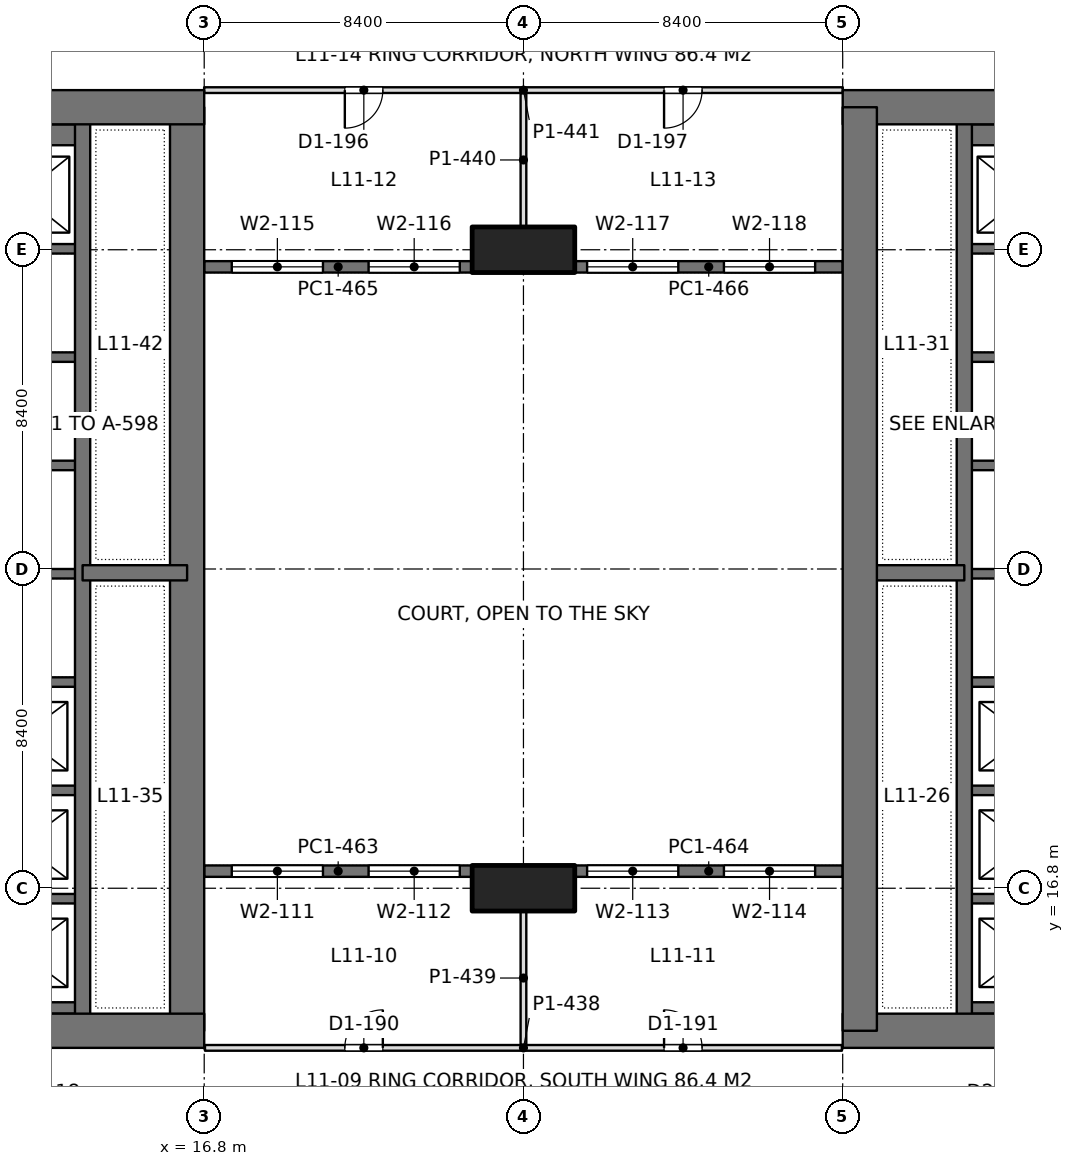
"""IFC4 building model, lengths in metres.
Left out: names, types, materials, properties, quantities, classifications, styles, units other than length and angle.
Written with IfcOpenShell. Run it as: python <this file> out.ifc"""

import sys

from ifc_helpers import new_model, si_unit, direction, frame, frame_2d, origin, origin_2d, place, context, subcontext, project, spatial, rectangle, extrude, element, fill, save


model = new_model("IFC4")
c1 = context("Model", 3, precision=1e-05, world=origin(), true_north=direction((0.0, 1.0)))
c2 = subcontext(c1, "Body", "Model", "MODEL_VIEW")
j1 = project(units=[si_unit("LENGTHUNIT", "METRE"), si_unit("PLANEANGLEUNIT", "RADIAN")], contexts=[c1])
p1 = place(None, origin())
s1 = spatial("IfcSite", under=j1, at=p1, CompositionType="ELEMENT")
p2 = place(p1, origin())
s2 = spatial("IfcBuilding", under=s1, at=p2, CompositionType="ELEMENT")
p3 = place(p2, frame((0.0, 0.0, 50.4)))
s3 = spatial("IfcBuildingStorey", under=s2, at=p3, CompositionType="ELEMENT", Elevation=50.4)
for number, where, z_axis, x_axis in (
    (1, (25.2, 16.8, 0.0), (0.0, 0.0, 1.0), (1.0, 0.0, 0.0)),
    (2, (25.2, 33.6, 0.0), (0.0, 0.0, 1.0), (1.0, 0.0, 0.0)),
):
    element("IfcColumn", number, at=place(p3, frame(where, z_axis=z_axis, x_axis=x_axis)), inside=s3, PredefinedType="COLUMN", context=c2, shape_type="SweptSolid", body=[
        extrude(rectangle(XDim=2.7, YDim=1.2, at=origin_2d()), origin(), (0.0, 0.0, 1.0), 4.5),
    ])
p4 = place(p3, frame((-1.2, 13.05, 0.0), z_axis=(0.0, 0.0, 1.0), x_axis=(1.0, 0.0, 0.0)))
e3 = element("IfcWall", 3, at=p4, inside=s3, PredefinedType="SHEAR", context=c2, shape_type="SweptSolid", body=[
    extrude(rectangle(XDim=18.0, YDim=0.9, at=frame_2d((9.0, 0.0))), origin(), (0.0, 0.0, 1.0), 4.5),
])
p5 = place(p4, frame((8.95, 0.0, 0.0)))
e4 = element("IfcOpeningElement", 4, at=p5, cuts=e3, PredefinedType="OPENING", context=c2, shape_type="SweptSolid", body=[
    extrude(rectangle(XDim=1.8, YDim=2.4, at=frame_2d((0.9, 1.2))), frame((0.0, 0.46, 0.0), z_axis=(0.0, -1.0, 0.0), x_axis=(1.0, 0.0, 0.0)), (0.0, 0.0, 1.0), 0.92),
])
p6 = place(p3, frame((-1.2, 37.35, 0.0), z_axis=(0.0, 0.0, 1.0), x_axis=(1.0, 0.0, 0.0)))
e5 = element("IfcWall", 5, at=p6, inside=s3, PredefinedType="SHEAR", context=c2, shape_type="SweptSolid", body=[
    extrude(rectangle(XDim=18.0, YDim=0.9, at=frame_2d((9.0, 0.0))), origin(), (0.0, 0.0, 1.0), 4.5),
])
p7 = place(p6, frame((8.95, 0.0, 0.0)))
e6 = element("IfcOpeningElement", 6, at=p7, cuts=e5, PredefinedType="OPENING", context=c2, shape_type="SweptSolid", body=[
    extrude(rectangle(XDim=1.8, YDim=2.4, at=frame_2d((0.9, 1.2))), frame((0.0, 0.46, 0.0), z_axis=(0.0, -1.0, 0.0), x_axis=(1.0, 0.0, 0.0)), (0.0, 0.0, 1.0), 0.92),
])
p8 = place(p3, frame((16.35, 13.05, 0.0), z_axis=(0.0, 0.0, 1.0), x_axis=(0.0, 1.0, 0.0)))
e7 = element("IfcWall", 7, at=p8, inside=s3, PredefinedType="SHEAR", context=c2, shape_type="SweptSolid", body=[
    extrude(rectangle(XDim=24.3, YDim=0.9, at=frame_2d((12.15, 0.0))), origin(), (0.0, 0.0, 1.0), 4.5),
])
p9 = place(p3, frame((13.6, 13.05, 0.0), z_axis=(0.0, 0.0, 1.0), x_axis=(0.0, 1.0, 0.0)))
e8 = element("IfcWall", 8, at=p9, inside=s3, PredefinedType="SHEAR", context=c2, shape_type="SweptSolid", body=[
    extrude(rectangle(XDim=24.3, YDim=0.4, at=frame_2d((12.15, 0.0))), origin(), (0.0, 0.0, 1.0), 4.5),
])
p10 = place(p3, frame((13.6, 25.1, 0.0), z_axis=(0.0, 0.0, 1.0), x_axis=(1.0, 0.0, 0.0)))
e9 = element("IfcWall", 9, at=p10, inside=s3, PredefinedType="SHEAR", context=c2, shape_type="SweptSolid", body=[
    extrude(rectangle(XDim=2.75, YDim=0.4, at=frame_2d((1.375, 0.0))), origin(), (0.0, 0.0, 1.0), 4.5),
])
p11 = place(p3, frame((10.4, 13.65, 0.0), z_axis=(0.0, 0.0, 1.0), x_axis=(1.0, 0.0, 0.0)))
e10 = element("IfcWall", 10, at=p11, inside=s3, PredefinedType="SHEAR", context=c2, shape_type="SweptSolid", body=[
    extrude(rectangle(XDim=3.2, YDim=0.3, at=frame_2d((1.6, 0.0))), origin(), (0.0, 0.0, 1.0), 4.5),
])
for number, where, z_axis, x_axis in (
    (11, (10.4, 16.525, 0.0), (0.0, 0.0, 1.0), (1.0, 0.0, 0.0)),
    (12, (10.4, 19.375, 0.0), (0.0, 0.0, 1.0), (1.0, 0.0, 0.0)),
    (13, (10.4, 22.225, 0.0), (0.0, 0.0, 1.0), (1.0, 0.0, 0.0)),
    (14, (10.4, 25.075, 0.0), (0.0, 0.0, 1.0), (1.0, 0.0, 0.0)),
    (15, (10.4, 27.925, 0.0), (0.0, 0.0, 1.0), (1.0, 0.0, 0.0)),
    (16, (10.4, 30.775, 0.0), (0.0, 0.0, 1.0), (1.0, 0.0, 0.0)),
    (17, (10.4, 33.625, 0.0), (0.0, 0.0, 1.0), (1.0, 0.0, 0.0)),
):
    element("IfcWall", number, at=place(p3, frame(where, z_axis=z_axis, x_axis=x_axis)), inside=s3, PredefinedType="SHEAR", context=c2, shape_type="SweptSolid", body=[
        extrude(rectangle(XDim=3.2, YDim=0.25, at=frame_2d((1.6, 0.0))), origin(), (0.0, 0.0, 1.0), 4.5),
    ])
p12 = place(p3, frame((10.4, 36.625, 0.0), z_axis=(0.0, 0.0, 1.0), x_axis=(1.0, 0.0, 0.0)))
e18 = element("IfcWall", 18, at=p12, inside=s3, PredefinedType="SHEAR", context=c2, shape_type="SweptSolid", body=[
    extrude(rectangle(XDim=3.2, YDim=0.55, at=frame_2d((1.6, 0.0))), origin(), (0.0, 0.0, 1.0), 4.5),
])
p13 = place(p3, frame((33.6, 13.05, 0.0), z_axis=(0.0, 0.0, 1.0), x_axis=(1.0, 0.0, 0.0)))
e19 = element("IfcWall", 19, at=p13, inside=s3, PredefinedType="SHEAR", context=c2, shape_type="SweptSolid", body=[
    extrude(rectangle(XDim=18.0, YDim=0.9, at=frame_2d((9.0, 0.0))), origin(), (0.0, 0.0, 1.0), 4.5),
])
p14 = place(p13, frame((7.25, 0.0, 0.0)))
e20 = element("IfcOpeningElement", 20, at=p14, cuts=e19, PredefinedType="OPENING", context=c2, shape_type="SweptSolid", body=[
    extrude(rectangle(XDim=1.8, YDim=2.4, at=frame_2d((0.9, 1.2))), frame((0.0, 0.46, 0.0), z_axis=(0.0, -1.0, 0.0), x_axis=(1.0, 0.0, 0.0)), (0.0, 0.0, 1.0), 0.92),
])
p15 = place(p3, frame((33.6, 37.35, 0.0), z_axis=(0.0, 0.0, 1.0), x_axis=(1.0, 0.0, 0.0)))
e21 = element("IfcWall", 21, at=p15, inside=s3, PredefinedType="SHEAR", context=c2, shape_type="SweptSolid", body=[
    extrude(rectangle(XDim=18.0, YDim=0.9, at=frame_2d((9.0, 0.0))), origin(), (0.0, 0.0, 1.0), 4.5),
])
p16 = place(p15, frame((7.25, 0.0, 0.0)))
e22 = element("IfcOpeningElement", 22, at=p16, cuts=e21, PredefinedType="OPENING", context=c2, shape_type="SweptSolid", body=[
    extrude(rectangle(XDim=1.8, YDim=2.4, at=frame_2d((0.9, 1.2))), frame((0.0, 0.46, 0.0), z_axis=(0.0, -1.0, 0.0), x_axis=(1.0, 0.0, 0.0)), (0.0, 0.0, 1.0), 0.92),
])
p17 = place(p3, frame((34.05, 13.05, 0.0), z_axis=(0.0, 0.0, 1.0), x_axis=(0.0, 1.0, 0.0)))
e23 = element("IfcWall", 23, at=p17, inside=s3, PredefinedType="SHEAR", context=c2, shape_type="SweptSolid", body=[
    extrude(rectangle(XDim=24.3, YDim=0.9, at=frame_2d((12.15, 0.0))), origin(), (0.0, 0.0, 1.0), 4.5),
])
p18 = place(p3, frame((36.8, 13.05, 0.0), z_axis=(0.0, 0.0, 1.0), x_axis=(0.0, 1.0, 0.0)))
e24 = element("IfcWall", 24, at=p18, inside=s3, PredefinedType="SHEAR", context=c2, shape_type="SweptSolid", body=[
    extrude(rectangle(XDim=24.3, YDim=0.4, at=frame_2d((12.15, 0.0))), origin(), (0.0, 0.0, 1.0), 4.5),
])
p19 = place(p3, frame((36.8, 25.1, 0.0), z_axis=(0.0, 0.0, 1.0), x_axis=(-1.0, 0.0, 0.0)))
e25 = element("IfcWall", 25, at=p19, inside=s3, PredefinedType="SHEAR", context=c2, shape_type="SweptSolid", body=[
    extrude(rectangle(XDim=2.75, YDim=0.4, at=frame_2d((1.375, 0.0))), origin(), (0.0, 0.0, 1.0), 4.5),
])
p20 = place(p3, frame((40.0, 13.65, 0.0), z_axis=(0.0, 0.0, 1.0), x_axis=(-1.0, 0.0, 0.0)))
e26 = element("IfcWall", 26, at=p20, inside=s3, PredefinedType="SHEAR", context=c2, shape_type="SweptSolid", body=[
    extrude(rectangle(XDim=3.2, YDim=0.3, at=frame_2d((1.6, 0.0))), origin(), (0.0, 0.0, 1.0), 4.5),
])
for number, where, z_axis, x_axis in (
    (27, (40.0, 16.525, 0.0), (0.0, 0.0, 1.0), (-1.0, 0.0, 0.0)),
    (28, (40.0, 19.375, 0.0), (0.0, 0.0, 1.0), (-1.0, 0.0, 0.0)),
    (29, (40.0, 22.225, 0.0), (0.0, 0.0, 1.0), (-1.0, 0.0, 0.0)),
    (30, (40.0, 25.075, 0.0), (0.0, 0.0, 1.0), (-1.0, 0.0, 0.0)),
    (31, (40.0, 27.925, 0.0), (0.0, 0.0, 1.0), (-1.0, 0.0, 0.0)),
    (32, (40.0, 30.775, 0.0), (0.0, 0.0, 1.0), (-1.0, 0.0, 0.0)),
    (33, (40.0, 33.625, 0.0), (0.0, 0.0, 1.0), (-1.0, 0.0, 0.0)),
):
    element("IfcWall", number, at=place(p3, frame(where, z_axis=z_axis, x_axis=x_axis)), inside=s3, PredefinedType="SHEAR", context=c2, shape_type="SweptSolid", body=[
        extrude(rectangle(XDim=3.2, YDim=0.25, at=frame_2d((1.6, 0.0))), origin(), (0.0, 0.0, 1.0), 4.5),
    ])
p21 = place(p3, frame((40.0, 36.625, 0.0), z_axis=(0.0, 0.0, 1.0), x_axis=(-1.0, 0.0, 0.0)))
e34 = element("IfcWall", 34, at=p21, inside=s3, PredefinedType="SHEAR", context=c2, shape_type="SweptSolid", body=[
    extrude(rectangle(XDim=3.2, YDim=0.55, at=frame_2d((1.6, 0.0))), origin(), (0.0, 0.0, 1.0), 4.5),
])
p22 = place(p3, frame((16.8, 17.25, 0.0), z_axis=(0.0, 0.0, 1.0), x_axis=(1.0, 0.0, 0.0)))
e35 = element("IfcWall", 35, at=p22, inside=s3, PredefinedType="SOLIDWALL", context=c2, shape_type="SweptSolid", body=[
    extrude(rectangle(XDim=7.05, YDim=0.3, at=frame_2d((3.525, 0.0))), origin(), (0.0, 0.0, 1.0), 4.34),
])
p23 = place(p22, frame((0.725, 0.0, 0.9)))
e36 = element("IfcOpeningElement", 36, at=p23, cuts=e35, PredefinedType="OPENING", context=c2, shape_type="SweptSolid", body=[
    extrude(rectangle(XDim=2.4, YDim=1.9, at=frame_2d((1.2, 0.95))), frame((0.0, 0.16, 0.0), z_axis=(0.0, -1.0, 0.0), x_axis=(1.0, 0.0, 0.0)), (0.0, 0.0, 1.0), 0.32),
])
p24 = place(p22, frame((4.325, 0.0, 0.9)))
e37 = element("IfcOpeningElement", 37, at=p24, cuts=e35, PredefinedType="OPENING", context=c2, shape_type="SweptSolid", body=[
    extrude(rectangle(XDim=2.4, YDim=1.9, at=frame_2d((1.2, 0.95))), frame((0.0, 0.16, 0.0), z_axis=(0.0, -1.0, 0.0), x_axis=(1.0, 0.0, 0.0)), (0.0, 0.0, 1.0), 0.32),
])
p25 = place(p3, frame((26.55, 17.25, 0.0), z_axis=(0.0, 0.0, 1.0), x_axis=(1.0, 0.0, 0.0)))
e38 = element("IfcWall", 38, at=p25, inside=s3, PredefinedType="SOLIDWALL", context=c2, shape_type="SweptSolid", body=[
    extrude(rectangle(XDim=7.05, YDim=0.3, at=frame_2d((3.525, 0.0))), origin(), (0.0, 0.0, 1.0), 4.34),
])
p26 = place(p25, frame((0.325, 0.0, 0.9)))
e39 = element("IfcOpeningElement", 39, at=p26, cuts=e38, PredefinedType="OPENING", context=c2, shape_type="SweptSolid", body=[
    extrude(rectangle(XDim=2.4, YDim=1.9, at=frame_2d((1.2, 0.95))), frame((0.0, 0.16, 0.0), z_axis=(0.0, -1.0, 0.0), x_axis=(1.0, 0.0, 0.0)), (0.0, 0.0, 1.0), 0.32),
])
p27 = place(p25, frame((3.925, 0.0, 0.9)))
e40 = element("IfcOpeningElement", 40, at=p27, cuts=e38, PredefinedType="OPENING", context=c2, shape_type="SweptSolid", body=[
    extrude(rectangle(XDim=2.4, YDim=1.9, at=frame_2d((1.2, 0.95))), frame((0.0, 0.16, 0.0), z_axis=(0.0, -1.0, 0.0), x_axis=(1.0, 0.0, 0.0)), (0.0, 0.0, 1.0), 0.32),
])
p28 = place(p3, frame((16.8, 33.15, 0.0), z_axis=(0.0, 0.0, 1.0), x_axis=(1.0, 0.0, 0.0)))
e41 = element("IfcWall", 41, at=p28, inside=s3, PredefinedType="SOLIDWALL", context=c2, shape_type="SweptSolid", body=[
    extrude(rectangle(XDim=7.05, YDim=0.3, at=frame_2d((3.525, 0.0))), origin(), (0.0, 0.0, 1.0), 4.34),
])
p29 = place(p28, frame((0.725, 0.0, 0.9)))
e42 = element("IfcOpeningElement", 42, at=p29, cuts=e41, PredefinedType="OPENING", context=c2, shape_type="SweptSolid", body=[
    extrude(rectangle(XDim=2.4, YDim=1.9, at=frame_2d((1.2, 0.95))), frame((0.0, 0.16, 0.0), z_axis=(0.0, -1.0, 0.0), x_axis=(1.0, 0.0, 0.0)), (0.0, 0.0, 1.0), 0.32),
])
p30 = place(p28, frame((4.325, 0.0, 0.9)))
e43 = element("IfcOpeningElement", 43, at=p30, cuts=e41, PredefinedType="OPENING", context=c2, shape_type="SweptSolid", body=[
    extrude(rectangle(XDim=2.4, YDim=1.9, at=frame_2d((1.2, 0.95))), frame((0.0, 0.16, 0.0), z_axis=(0.0, -1.0, 0.0), x_axis=(1.0, 0.0, 0.0)), (0.0, 0.0, 1.0), 0.32),
])
p31 = place(p3, frame((26.55, 33.15, 0.0), z_axis=(0.0, 0.0, 1.0), x_axis=(1.0, 0.0, 0.0)))
e44 = element("IfcWall", 44, at=p31, inside=s3, PredefinedType="SOLIDWALL", context=c2, shape_type="SweptSolid", body=[
    extrude(rectangle(XDim=7.05, YDim=0.3, at=frame_2d((3.525, 0.0))), origin(), (0.0, 0.0, 1.0), 4.34),
])
p32 = place(p31, frame((0.325, 0.0, 0.9)))
e45 = element("IfcOpeningElement", 45, at=p32, cuts=e44, PredefinedType="OPENING", context=c2, shape_type="SweptSolid", body=[
    extrude(rectangle(XDim=2.4, YDim=1.9, at=frame_2d((1.2, 0.95))), frame((0.0, 0.16, 0.0), z_axis=(0.0, -1.0, 0.0), x_axis=(1.0, 0.0, 0.0)), (0.0, 0.0, 1.0), 0.32),
])
p33 = place(p31, frame((3.925, 0.0, 0.9)))
e46 = element("IfcOpeningElement", 46, at=p33, cuts=e44, PredefinedType="OPENING", context=c2, shape_type="SweptSolid", body=[
    extrude(rectangle(XDim=2.4, YDim=1.9, at=frame_2d((1.2, 0.95))), frame((0.0, 0.16, 0.0), z_axis=(0.0, -1.0, 0.0), x_axis=(1.0, 0.0, 0.0)), (0.0, 0.0, 1.0), 0.32),
])
p34 = place(p3, frame((16.82, 12.6, 0.0), z_axis=(0.0, 0.0, 1.0), x_axis=(1.0, 0.0, 0.0)))
e47 = element("IfcWall", 47, at=p34, inside=s3, PredefinedType="PARTITIONING", context=c2, shape_type="SweptSolid", body=[
    extrude(rectangle(XDim=16.76, YDim=0.15, at=frame_2d((8.38, 0.0))), origin(), (0.0, 0.0, 1.0), 3.74),
])
p35 = place(p34, frame((3.68, 0.0, 0.0)))
e48 = element("IfcOpeningElement", 48, at=p35, cuts=e47, PredefinedType="OPENING", context=c2, shape_type="SweptSolid", body=[
    extrude(rectangle(XDim=1.0, YDim=2.2, at=frame_2d((0.5, 1.1))), frame((0.0, 0.085, 0.0), z_axis=(0.0, -1.0, 0.0), x_axis=(1.0, 0.0, 0.0)), (0.0, 0.0, 1.0), 0.17),
])
p36 = place(p34, frame((12.08, 0.0, 0.0)))
e49 = element("IfcOpeningElement", 49, at=p36, cuts=e47, PredefinedType="OPENING", context=c2, shape_type="SweptSolid", body=[
    extrude(rectangle(XDim=1.0, YDim=2.2, at=frame_2d((0.5, 1.1))), frame((0.0, 0.085, 0.0), z_axis=(0.0, -1.0, 0.0), x_axis=(1.0, 0.0, 0.0)), (0.0, 0.0, 1.0), 0.17),
])
p37 = place(p3, frame((25.2, 12.674, 0.0), z_axis=(0.0, 0.0, 1.0), x_axis=(0.0, 1.0, 0.0)))
e50 = element("IfcWall", 50, at=p37, inside=s3, PredefinedType="PARTITIONING", context=c2, shape_type="SweptSolid", body=[
    extrude(rectangle(XDim=3.527, YDim=0.15, at=frame_2d((1.763, 0.0))), origin(), (0.0, 0.0, 1.0), 3.74),
])
p38 = place(p3, frame((16.798, 37.8, 0.0), z_axis=(0.0, 0.0, 1.0), x_axis=(1.0, 0.0, 0.0)))
e51 = element("IfcWall", 51, at=p38, inside=s3, PredefinedType="PARTITIONING", context=c2, shape_type="SweptSolid", body=[
    extrude(rectangle(XDim=16.804, YDim=0.15, at=frame_2d((8.402, 0.0))), origin(), (0.0, 0.0, 1.0), 3.74),
])
p39 = place(p38, frame((3.702, 0.0, 0.0)))
e52 = element("IfcOpeningElement", 52, at=p39, cuts=e51, PredefinedType="OPENING", context=c2, shape_type="SweptSolid", body=[
    extrude(rectangle(XDim=1.0, YDim=2.2, at=frame_2d((0.5, 1.1))), frame((0.0, 0.085, 0.0), z_axis=(0.0, -1.0, 0.0), x_axis=(1.0, 0.0, 0.0)), (0.0, 0.0, 1.0), 0.17),
])
p40 = place(p38, frame((12.102, 0.0, 0.0)))
e53 = element("IfcOpeningElement", 53, at=p40, cuts=e51, PredefinedType="OPENING", context=c2, shape_type="SweptSolid", body=[
    extrude(rectangle(XDim=1.0, YDim=2.2, at=frame_2d((0.5, 1.1))), frame((0.0, 0.085, 0.0), z_axis=(0.0, -1.0, 0.0), x_axis=(1.0, 0.0, 0.0)), (0.0, 0.0, 1.0), 0.17),
])
p41 = place(p3, frame((25.2, 34.199, 0.0), z_axis=(0.0, 0.0, 1.0), x_axis=(0.0, 1.0, 0.0)))
e54 = element("IfcWall", 54, at=p41, inside=s3, PredefinedType="PARTITIONING", context=c2, shape_type="SweptSolid", body=[
    extrude(rectangle(XDim=3.527, YDim=0.15, at=frame_2d((1.764, 0.0))), origin(), (0.0, 0.0, 1.0), 3.74),
])
p42 = place(p23, origin())
e55 = element("IfcWindow", 55, at=p42, inside=s3, PartitioningType="SINGLE_PANEL", PredefinedType="WINDOW", context=c2, shape_type="SweptSolid", body=[
    extrude(rectangle(XDim=2.4, YDim=1.9, at=frame_2d((1.2, 0.95))), frame((0.0, 0.03, 0.0), z_axis=(0.0, -1.0, 0.0), x_axis=(1.0, 0.0, 0.0)), (0.0, 0.0, 1.0), 0.06),
])
fill(e36, e55)
p43 = place(p24, origin())
e56 = element("IfcWindow", 56, at=p43, inside=s3, PartitioningType="SINGLE_PANEL", PredefinedType="WINDOW", context=c2, shape_type="SweptSolid", body=[
    extrude(rectangle(XDim=2.4, YDim=1.9, at=frame_2d((1.2, 0.95))), frame((0.0, 0.03, 0.0), z_axis=(0.0, -1.0, 0.0), x_axis=(1.0, 0.0, 0.0)), (0.0, 0.0, 1.0), 0.06),
])
fill(e37, e56)
p44 = place(p26, origin())
e57 = element("IfcWindow", 57, at=p44, inside=s3, PartitioningType="SINGLE_PANEL", PredefinedType="WINDOW", context=c2, shape_type="SweptSolid", body=[
    extrude(rectangle(XDim=2.4, YDim=1.9, at=frame_2d((1.2, 0.95))), frame((0.0, 0.03, 0.0), z_axis=(0.0, -1.0, 0.0), x_axis=(1.0, 0.0, 0.0)), (0.0, 0.0, 1.0), 0.06),
])
fill(e39, e57)
p45 = place(p27, origin())
e58 = element("IfcWindow", 58, at=p45, inside=s3, PartitioningType="SINGLE_PANEL", PredefinedType="WINDOW", context=c2, shape_type="SweptSolid", body=[
    extrude(rectangle(XDim=2.4, YDim=1.9, at=frame_2d((1.2, 0.95))), frame((0.0, 0.03, 0.0), z_axis=(0.0, -1.0, 0.0), x_axis=(1.0, 0.0, 0.0)), (0.0, 0.0, 1.0), 0.06),
])
fill(e40, e58)
p46 = place(p29, origin())
e59 = element("IfcWindow", 59, at=p46, inside=s3, PartitioningType="SINGLE_PANEL", PredefinedType="WINDOW", context=c2, shape_type="SweptSolid", body=[
    extrude(rectangle(XDim=2.4, YDim=1.9, at=frame_2d((1.2, 0.95))), frame((0.0, 0.03, 0.0), z_axis=(0.0, -1.0, 0.0), x_axis=(1.0, 0.0, 0.0)), (0.0, 0.0, 1.0), 0.06),
])
fill(e42, e59)
p47 = place(p30, origin())
e60 = element("IfcWindow", 60, at=p47, inside=s3, PartitioningType="SINGLE_PANEL", PredefinedType="WINDOW", context=c2, shape_type="SweptSolid", body=[
    extrude(rectangle(XDim=2.4, YDim=1.9, at=frame_2d((1.2, 0.95))), frame((0.0, 0.03, 0.0), z_axis=(0.0, -1.0, 0.0), x_axis=(1.0, 0.0, 0.0)), (0.0, 0.0, 1.0), 0.06),
])
fill(e43, e60)
p48 = place(p32, origin())
e61 = element("IfcWindow", 61, at=p48, inside=s3, PartitioningType="SINGLE_PANEL", PredefinedType="WINDOW", context=c2, shape_type="SweptSolid", body=[
    extrude(rectangle(XDim=2.4, YDim=1.9, at=frame_2d((1.2, 0.95))), frame((0.0, 0.03, 0.0), z_axis=(0.0, -1.0, 0.0), x_axis=(1.0, 0.0, 0.0)), (0.0, 0.0, 1.0), 0.06),
])
fill(e45, e61)
p49 = place(p33, origin())
e62 = element("IfcWindow", 62, at=p49, inside=s3, PartitioningType="SINGLE_PANEL", PredefinedType="WINDOW", context=c2, shape_type="SweptSolid", body=[
    extrude(rectangle(XDim=2.4, YDim=1.9, at=frame_2d((1.2, 0.95))), frame((0.0, 0.03, 0.0), z_axis=(0.0, -1.0, 0.0), x_axis=(1.0, 0.0, 0.0)), (0.0, 0.0, 1.0), 0.06),
])
fill(e46, e62)
p50 = place(p35, origin())
e63 = element("IfcDoor", 63, at=p50, inside=s3, OperationType="SINGLE_SWING_RIGHT", PredefinedType="DOOR", context=c2, shape_type="SweptSolid", body=[
    extrude(rectangle(XDim=1.0, YDim=2.2, at=frame_2d((0.5, 1.1))), frame((0.0, 0.025, 0.0), z_axis=(0.0, -1.0, 0.0), x_axis=(1.0, 0.0, 0.0)), (0.0, 0.0, 1.0), 0.05),
])
fill(e48, e63)
p51 = place(p36, origin())
e64 = element("IfcDoor", 64, at=p51, inside=s3, OperationType="SINGLE_SWING_LEFT", PredefinedType="DOOR", context=c2, shape_type="SweptSolid", body=[
    extrude(rectangle(XDim=1.0, YDim=2.2, at=frame_2d((0.5, 1.1))), frame((0.0, 0.025, 0.0), z_axis=(0.0, -1.0, 0.0), x_axis=(1.0, 0.0, 0.0)), (0.0, 0.0, 1.0), 0.05),
])
fill(e49, e64)
p52 = place(p39, frame((1.0, 0.0, 0.0), z_axis=(0.0, 0.0, 1.0), x_axis=(-1.0, 0.0, 0.0)))
e65 = element("IfcDoor", 65, at=p52, inside=s3, OperationType="SINGLE_SWING_RIGHT", PredefinedType="DOOR", context=c2, shape_type="SweptSolid", body=[
    extrude(rectangle(XDim=1.0, YDim=2.2, at=frame_2d((0.5, 1.1))), frame((0.0, 0.025, 0.0), z_axis=(0.0, -1.0, 0.0), x_axis=(1.0, 0.0, 0.0)), (0.0, 0.0, 1.0), 0.05),
])
fill(e52, e65)
p53 = place(p40, frame((1.0, 0.0, 0.0), z_axis=(0.0, 0.0, 1.0), x_axis=(-1.0, 0.0, 0.0)))
e66 = element("IfcDoor", 66, at=p53, inside=s3, OperationType="SINGLE_SWING_RIGHT", PredefinedType="DOOR", context=c2, shape_type="SweptSolid", body=[
    extrude(rectangle(XDim=1.0, YDim=2.2, at=frame_2d((0.5, 1.1))), frame((0.0, 0.025, 0.0), z_axis=(0.0, -1.0, 0.0), x_axis=(1.0, 0.0, 0.0)), (0.0, 0.0, 1.0), 0.05),
])
fill(e53, e66)
save(model, sys.argv[1])
